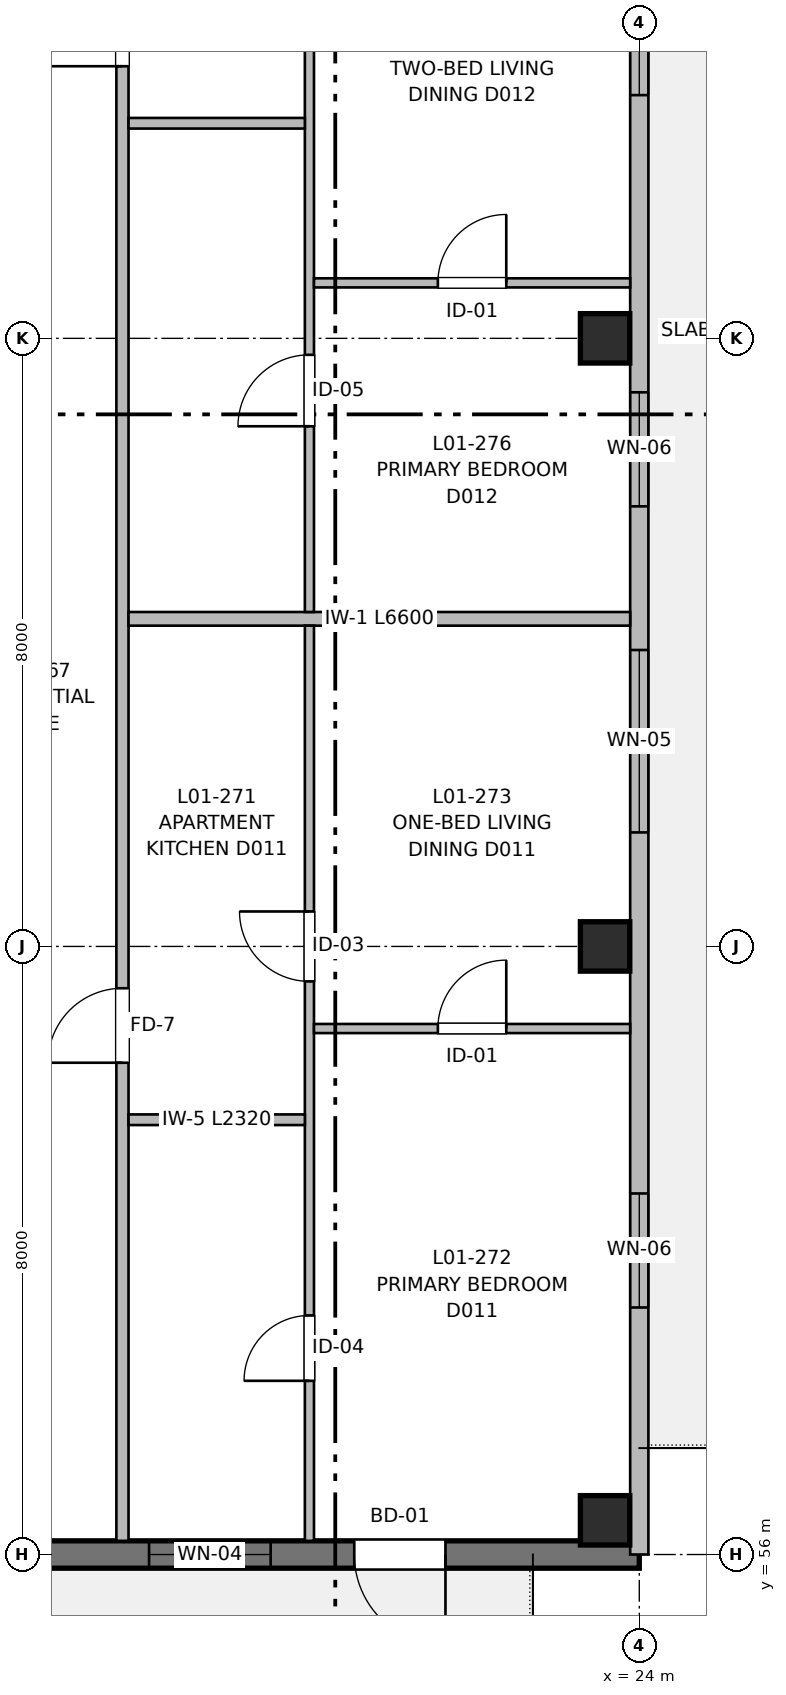
"""IFC4 building model, lengths in metres.
Left out: names, types, materials, properties, quantities, classifications, styles, units other than length and angle.
Written with IfcOpenShell. Run it as: python <this file> out.ifc"""

import sys

from ifc_helpers import new_model, si_unit, direction, frame, frame_2d, origin, origin_2d, place, context, subcontext, project, spatial, rectangle, extrude, element, fill, save


model = new_model("IFC4")
c1 = context("Model", 3, precision=1e-05, world=origin(), true_north=direction((0.0, 1.0)))
c2 = subcontext(c1, "Body", "Model", "MODEL_VIEW")
j1 = project(units=[si_unit("LENGTHUNIT", "METRE"), si_unit("PLANEANGLEUNIT", "RADIAN")], contexts=[c1])
p1 = place(None, origin())
s1 = spatial("IfcSite", under=j1, at=p1, CompositionType="ELEMENT")
p2 = place(p1, origin())
s2 = spatial("IfcBuilding", under=s1, at=p2, CompositionType="ELEMENT")
p3 = place(p2, frame((0.0, 0.0, 4.16)))
s3 = spatial("IfcBuildingStorey", under=s2, at=p3, CompositionType="ELEMENT", Elevation=4.16)
for number, where, z_axis, x_axis in (
    (1, (23.55, 56.45, 0.0), (0.0, 0.0, 1.0), (1.0, 0.0, 0.0)),
    (2, (23.55, 64.0, 0.0), (0.0, 0.0, 1.0), (1.0, 0.0, 0.0)),
    (3, (23.55, 72.0, 0.0), (0.0, 0.0, 1.0), (1.0, 0.0, 0.0)),
):
    element("IfcColumn", number, at=place(p3, frame(where, z_axis=z_axis, x_axis=x_axis)), inside=s3, PredefinedType="COLUMN", context=c2, shape_type="SweptSolid", body=[
        extrude(rectangle(XDim=0.65, YDim=0.65, at=origin_2d()), origin(), (0.0, 0.0, 1.0), 3.2),
    ])
p4 = place(p3, frame((24.0, 56.0, 0.0), z_axis=(0.0, 0.0, 1.0), x_axis=(-1.0, 0.0, 0.0)))
e4 = element("IfcWall", 4, at=p4, inside=s3, PredefinedType="SHEAR", context=c2, shape_type="SweptSolid", body=[
    extrude(rectangle(XDim=16.0, YDim=0.36, at=frame_2d((8.0, 0.0))), origin(), (0.0, 0.0, 1.0), 2.98),
])
p5 = place(p4, frame((2.55, 0.0, 0.0)))
e5 = element("IfcOpeningElement", 5, at=p5, cuts=e4, PredefinedType="OPENING", context=c2, shape_type="SweptSolid", body=[
    extrude(rectangle(XDim=1.2, YDim=2.2, at=frame_2d((0.6, 1.1))), frame((0.0, 0.19, 0.0), z_axis=(0.0, -1.0, 0.0), x_axis=(1.0, 0.0, 0.0)), (0.0, 0.0, 1.0), 0.38),
])
p6 = place(p4, frame((4.85, 0.0, 0.77)))
e6 = element("IfcOpeningElement", 6, at=p6, cuts=e4, PredefinedType="OPENING", context=c2, shape_type="SweptSolid", body=[
    extrude(rectangle(XDim=1.6, YDim=1.45, at=frame_2d((0.8, 0.725))), frame((0.0, 0.19, 0.0), z_axis=(0.0, -1.0, 0.0), x_axis=(1.0, 0.0, 0.0)), (0.0, 0.0, 1.0), 0.38),
])
p7 = place(p4, frame((11.2, 0.0, 0.77)))
e7 = element("IfcOpeningElement", 7, at=p7, cuts=e4, PredefinedType="OPENING", context=c2, shape_type="SweptSolid", body=[
    extrude(rectangle(XDim=1.6, YDim=1.45, at=frame_2d((0.8, 0.725))), frame((0.0, 0.19, 0.0), z_axis=(0.0, -1.0, 0.0), x_axis=(1.0, 0.0, 0.0)), (0.0, 0.0, 1.0), 0.38),
])
p8 = place(p3, frame((24.0, 88.0, 0.0), z_axis=(0.0, 0.0, 1.0), x_axis=(0.0, -1.0, 0.0)))
e8 = element("IfcWall", 8, at=p8, inside=s3, PredefinedType="SOLIDWALL", context=c2, shape_type="SweptSolid", body=[
    extrude(rectangle(XDim=32.0, YDim=0.24, at=frame_2d((16.0, 0.0))), origin(), (0.0, 0.0, 1.0), 2.98),
])
p9 = place(p8, frame((3.4, 0.0, 0.0)))
e9 = element("IfcOpeningElement", 9, at=p9, cuts=e8, PredefinedType="OPENING", context=c2, shape_type="SweptSolid", body=[
    extrude(rectangle(XDim=1.2, YDim=2.2, at=frame_2d((0.6, 1.1))), frame((0.0, 0.13, 0.0), z_axis=(0.0, -1.0, 0.0), x_axis=(1.0, 0.0, 0.0)), (0.0, 0.0, 1.0), 0.26),
])
p10 = place(p8, frame((5.75, 0.0, 0.77)))
e10 = element("IfcOpeningElement", 10, at=p10, cuts=e8, PredefinedType="OPENING", context=c2, shape_type="SweptSolid", body=[
    extrude(rectangle(XDim=1.6, YDim=1.45, at=frame_2d((0.8, 0.725))), frame((0.0, 0.13, 0.0), z_axis=(0.0, -1.0, 0.0), x_axis=(1.0, 0.0, 0.0)), (0.0, 0.0, 1.0), 0.26),
])
p11 = place(p8, frame((11.2, 0.0, 0.77)))
e11 = element("IfcOpeningElement", 11, at=p11, cuts=e8, PredefinedType="OPENING", context=c2, shape_type="SweptSolid", body=[
    extrude(rectangle(XDim=1.6, YDim=1.45, at=frame_2d((0.8, 0.725))), frame((0.0, 0.13, 0.0), z_axis=(0.0, -1.0, 0.0), x_axis=(1.0, 0.0, 0.0)), (0.0, 0.0, 1.0), 0.26),
])
p12 = place(p8, frame((20.1, 0.0, 0.72)))
e12 = element("IfcOpeningElement", 12, at=p12, cuts=e8, PredefinedType="OPENING", context=c2, shape_type="SweptSolid", body=[
    extrude(rectangle(XDim=2.4, YDim=1.5, at=frame_2d((1.2, 0.75))), frame((0.0, 0.13, 0.0), z_axis=(0.0, -1.0, 0.0), x_axis=(1.0, 0.0, 0.0)), (0.0, 0.0, 1.0), 0.26),
])
p13 = place(p8, frame((27.25, 0.0, 0.82)))
e13 = element("IfcOpeningElement", 13, at=p13, cuts=e8, PredefinedType="OPENING", context=c2, shape_type="SweptSolid", body=[
    extrude(rectangle(XDim=1.5, YDim=1.4, at=frame_2d((0.75, 0.7))), frame((0.0, 0.13, 0.0), z_axis=(0.0, -1.0, 0.0), x_axis=(1.0, 0.0, 0.0)), (0.0, 0.0, 1.0), 0.26),
])
p14 = place(p8, frame((16.71, 0.0, 0.82)))
e14 = element("IfcOpeningElement", 14, at=p14, cuts=e8, PredefinedType="OPENING", context=c2, shape_type="SweptSolid", body=[
    extrude(rectangle(XDim=1.5, YDim=1.4, at=frame_2d((0.75, 0.7))), frame((0.0, 0.13, 0.0), z_axis=(0.0, -1.0, 0.0), x_axis=(1.0, 0.0, 0.0)), (0.0, 0.0, 1.0), 0.26),
])
p15 = place(p3, frame((17.2, 56.18, 0.0), z_axis=(0.0, 0.0, 1.0), x_axis=(0.0, 1.0, 0.0)))
e15 = element("IfcWall", 15, at=p15, inside=s3, PredefinedType="PARTITIONING", context=c2, shape_type="SweptSolid", body=[
    extrude(rectangle(XDim=50.62, YDim=0.16, at=frame_2d((25.31, 0.0))), origin(), (0.0, 0.0, 1.0), 2.935),
])
p16 = place(p15, frame((6.29, 0.0, 0.0)))
e16 = element("IfcOpeningElement", 16, at=p16, cuts=e15, PredefinedType="OPENING", context=c2, shape_type="SweptSolid", body=[
    extrude(rectangle(XDim=0.98, YDim=2.15, at=frame_2d((0.49, 1.075))), frame((0.0, 0.09, 0.0), z_axis=(0.0, -1.0, 0.0), x_axis=(1.0, 0.0, 0.0)), (0.0, 0.0, 1.0), 0.18),
])
p17 = place(p15, frame((19.4, 0.0, 0.0)))
e17 = element("IfcOpeningElement", 17, at=p17, cuts=e15, PredefinedType="OPENING", context=c2, shape_type="SweptSolid", body=[
    extrude(rectangle(XDim=1.02, YDim=2.15, at=frame_2d((0.51, 1.075))), frame((0.0, 0.09, 0.0), z_axis=(0.0, -1.0, 0.0), x_axis=(1.0, 0.0, 0.0)), (0.0, 0.0, 1.0), 0.18),
])
p18 = place(p15, frame((33.08, 0.0, 0.0)))
e18 = element("IfcOpeningElement", 18, at=p18, cuts=e15, PredefinedType="OPENING", context=c2, shape_type="SweptSolid", body=[
    extrude(rectangle(XDim=0.98, YDim=2.15, at=frame_2d((0.49, 1.075))), frame((0.0, 0.09, 0.0), z_axis=(0.0, -1.0, 0.0), x_axis=(1.0, 0.0, 0.0)), (0.0, 0.0, 1.0), 0.18),
])
p19 = place(p15, frame((45.33, 0.0, 0.0)))
e19 = element("IfcOpeningElement", 19, at=p19, cuts=e15, PredefinedType="OPENING", context=c2, shape_type="SweptSolid", body=[
    extrude(rectangle(XDim=0.98, YDim=2.15, at=frame_2d((0.49, 1.075))), frame((0.0, 0.09, 0.0), z_axis=(0.0, -1.0, 0.0), x_axis=(1.0, 0.0, 0.0)), (0.0, 0.0, 1.0), 0.18),
])
p20 = place(p3, frame((17.28, 68.31, 0.0), z_axis=(0.0, 0.0, 1.0), x_axis=(1.0, 0.0, 0.0)))
e20 = element("IfcWall", 20, at=p20, inside=s3, PredefinedType="PARTITIONING", context=c2, shape_type="SweptSolid", body=[
    extrude(rectangle(XDim=6.6, YDim=0.18, at=frame_2d((3.3, 0.0))), origin(), (0.0, 0.0, 1.0), 2.935),
])
p21 = place(p3, frame((19.66, 56.18, 0.0), z_axis=(0.0, 0.0, 1.0), x_axis=(0.0, 1.0, 0.0)))
e21 = element("IfcWall", 21, at=p21, inside=s3, PredefinedType="PARTITIONING", context=c2, shape_type="SweptSolid", body=[
    extrude(rectangle(XDim=12.04, YDim=0.12, at=frame_2d((6.02, 0.0))), origin(), (0.0, 0.0, 1.0), 2.935),
])
p22 = place(p21, frame((2.105, 0.0, 0.0)))
e22 = element("IfcOpeningElement", 22, at=p22, cuts=e21, PredefinedType="OPENING", context=c2, shape_type="SweptSolid", body=[
    extrude(rectangle(XDim=0.86, YDim=2.1, at=frame_2d((0.43, 1.05))), frame((0.0, 0.07, 0.0), z_axis=(0.0, -1.0, 0.0), x_axis=(1.0, 0.0, 0.0)), (0.0, 0.0, 1.0), 0.14),
])
p23 = place(p21, frame((7.36, 0.0, 0.0)))
e23 = element("IfcOpeningElement", 23, at=p23, cuts=e21, PredefinedType="OPENING", context=c2, shape_type="SweptSolid", body=[
    extrude(rectangle(XDim=0.92, YDim=2.1, at=frame_2d((0.46, 1.05))), frame((0.0, 0.07, 0.0), z_axis=(0.0, -1.0, 0.0), x_axis=(1.0, 0.0, 0.0)), (0.0, 0.0, 1.0), 0.14),
])
p24 = place(p3, frame((17.28, 61.72, 0.0), z_axis=(0.0, 0.0, 1.0), x_axis=(1.0, 0.0, 0.0)))
e24 = element("IfcWall", 24, at=p24, inside=s3, PredefinedType="PARTITIONING", context=c2, shape_type="SweptSolid", body=[
    extrude(rectangle(XDim=2.32, YDim=0.14, at=frame_2d((1.16, 0.0))), origin(), (0.0, 0.0, 1.0), 2.935),
])
p25 = place(p3, frame((19.72, 62.92, 0.0), z_axis=(0.0, 0.0, 1.0), x_axis=(1.0, 0.0, 0.0)))
e25 = element("IfcWall", 25, at=p25, inside=s3, PredefinedType="PARTITIONING", context=c2, shape_type="SweptSolid", body=[
    extrude(rectangle(XDim=4.16, YDim=0.12, at=frame_2d((2.08, 0.0))), origin(), (0.0, 0.0, 1.0), 2.935),
])
p26 = place(p25, frame((1.63, 0.0, 0.0)))
e26 = element("IfcOpeningElement", 26, at=p26, cuts=e25, PredefinedType="OPENING", context=c2, shape_type="SweptSolid", body=[
    extrude(rectangle(XDim=0.9, YDim=2.1, at=frame_2d((0.45, 1.05))), frame((0.0, 0.07, 0.0), z_axis=(0.0, -1.0, 0.0), x_axis=(1.0, 0.0, 0.0)), (0.0, 0.0, 1.0), 0.14),
])
p27 = place(p3, frame((19.66, 68.4, 0.0), z_axis=(0.0, 0.0, 1.0), x_axis=(0.0, 1.0, 0.0)))
e27 = element("IfcWall", 27, at=p27, inside=s3, PredefinedType="PARTITIONING", context=c2, shape_type="SweptSolid", body=[
    extrude(rectangle(XDim=13.97, YDim=0.12, at=frame_2d((6.985, 0.0))), origin(), (0.0, 0.0, 1.0), 2.935),
])
p28 = place(p27, frame((2.443, 0.0, 0.0)))
e28 = element("IfcOpeningElement", 28, at=p28, cuts=e27, PredefinedType="OPENING", context=c2, shape_type="SweptSolid", body=[
    extrude(rectangle(XDim=0.94, YDim=2.1, at=frame_2d((0.47, 1.05))), frame((0.0, 0.07, 0.0), z_axis=(0.0, -1.0, 0.0), x_axis=(1.0, 0.0, 0.0)), (0.0, 0.0, 1.0), 0.14),
])
p29 = place(p27, frame((8.541, 0.0, 0.0)))
e29 = element("IfcOpeningElement", 29, at=p29, cuts=e27, PredefinedType="OPENING", context=c2, shape_type="SweptSolid", body=[
    extrude(rectangle(XDim=0.92, YDim=2.1, at=frame_2d((0.46, 1.05))), frame((0.0, 0.07, 0.0), z_axis=(0.0, -1.0, 0.0), x_axis=(1.0, 0.0, 0.0)), (0.0, 0.0, 1.0), 0.14),
])
p30 = place(p3, frame((17.28, 74.83, 0.0), z_axis=(0.0, 0.0, 1.0), x_axis=(1.0, 0.0, 0.0)))
e30 = element("IfcWall", 30, at=p30, inside=s3, PredefinedType="PARTITIONING", context=c2, shape_type="SweptSolid", body=[
    extrude(rectangle(XDim=2.32, YDim=0.14, at=frame_2d((1.16, 0.0))), origin(), (0.0, 0.0, 1.0), 2.935),
])
p31 = place(p3, frame((19.72, 72.73, 0.0), z_axis=(0.0, 0.0, 1.0), x_axis=(1.0, 0.0, 0.0)))
e31 = element("IfcWall", 31, at=p31, inside=s3, PredefinedType="PARTITIONING", context=c2, shape_type="SweptSolid", body=[
    extrude(rectangle(XDim=4.16, YDim=0.12, at=frame_2d((2.08, 0.0))), origin(), (0.0, 0.0, 1.0), 2.935),
])
p32 = place(p31, frame((1.63, 0.0, 0.0)))
e32 = element("IfcOpeningElement", 32, at=p32, cuts=e31, PredefinedType="OPENING", context=c2, shape_type="SweptSolid", body=[
    extrude(rectangle(XDim=0.9, YDim=2.1, at=frame_2d((0.45, 1.05))), frame((0.0, 0.07, 0.0), z_axis=(0.0, -1.0, 0.0), x_axis=(1.0, 0.0, 0.0)), (0.0, 0.0, 1.0), 0.14),
])
p33 = place(p5, origin())
e33 = element("IfcDoor", 33, at=p33, inside=s3, OperationType="SINGLE_SWING_LEFT", PredefinedType="DOOR", context=c2, shape_type="SweptSolid", body=[
    extrude(rectangle(XDim=1.2, YDim=2.2, at=frame_2d((0.6, 1.1))), frame((0.0, 0.025, 0.0), z_axis=(0.0, -1.0, 0.0), x_axis=(1.0, 0.0, 0.0)), (0.0, 0.0, 1.0), 0.05),
])
fill(e5, e33)
p34 = place(p6, origin())
e34 = element("IfcWindow", 34, at=p34, inside=s3, PartitioningType="SINGLE_PANEL", PredefinedType="WINDOW", context=c2, shape_type="SweptSolid", body=[
    extrude(rectangle(XDim=1.6, YDim=1.45, at=frame_2d((0.8, 0.725))), frame((0.0, 0.03, 0.0), z_axis=(0.0, -1.0, 0.0), x_axis=(1.0, 0.0, 0.0)), (0.0, 0.0, 1.0), 0.06),
])
fill(e6, e34)
p35 = place(p11, origin())
e35 = element("IfcWindow", 35, at=p35, inside=s3, PartitioningType="SINGLE_PANEL", PredefinedType="WINDOW", context=c2, shape_type="SweptSolid", body=[
    extrude(rectangle(XDim=1.6, YDim=1.45, at=frame_2d((0.8, 0.725))), frame((0.0, 0.03, 0.0), z_axis=(0.0, -1.0, 0.0), x_axis=(1.0, 0.0, 0.0)), (0.0, 0.0, 1.0), 0.06),
])
fill(e11, e35)
p36 = place(p12, origin())
e36 = element("IfcWindow", 36, at=p36, inside=s3, PartitioningType="SINGLE_PANEL", PredefinedType="WINDOW", context=c2, shape_type="SweptSolid", body=[
    extrude(rectangle(XDim=2.4, YDim=1.5, at=frame_2d((1.2, 0.75))), frame((0.0, 0.03, 0.0), z_axis=(0.0, -1.0, 0.0), x_axis=(1.0, 0.0, 0.0)), (0.0, 0.0, 1.0), 0.06),
])
fill(e12, e36)
p37 = place(p13, origin())
e37 = element("IfcWindow", 37, at=p37, inside=s3, PartitioningType="SINGLE_PANEL", PredefinedType="WINDOW", context=c2, shape_type="SweptSolid", body=[
    extrude(rectangle(XDim=1.5, YDim=1.4, at=frame_2d((0.75, 0.7))), frame((0.0, 0.03, 0.0), z_axis=(0.0, -1.0, 0.0), x_axis=(1.0, 0.0, 0.0)), (0.0, 0.0, 1.0), 0.06),
])
fill(e13, e37)
p38 = place(p22, origin())
e38 = element("IfcDoor", 38, at=p38, inside=s3, OperationType="SINGLE_SWING_LEFT", PredefinedType="DOOR", context=c2, shape_type="SweptSolid", body=[
    extrude(rectangle(XDim=0.86, YDim=2.1, at=frame_2d((0.43, 1.05))), frame((0.0, 0.025, 0.0), z_axis=(0.0, -1.0, 0.0), x_axis=(1.0, 0.0, 0.0)), (0.0, 0.0, 1.0), 0.05),
])
fill(e22, e38)
p39 = place(p23, origin())
e39 = element("IfcDoor", 39, at=p39, inside=s3, OperationType="SINGLE_SWING_RIGHT", PredefinedType="DOOR", context=c2, shape_type="SweptSolid", body=[
    extrude(rectangle(XDim=0.92, YDim=2.1, at=frame_2d((0.46, 1.05))), frame((0.0, 0.025, 0.0), z_axis=(0.0, -1.0, 0.0), x_axis=(1.0, 0.0, 0.0)), (0.0, 0.0, 1.0), 0.05),
])
fill(e23, e39)
p40 = place(p16, origin())
e40 = element("IfcDoor", 40, at=p40, inside=s3, OperationType="SINGLE_SWING_LEFT", PredefinedType="DOOR", context=c2, shape_type="SweptSolid", body=[
    extrude(rectangle(XDim=0.98, YDim=2.15, at=frame_2d((0.49, 1.075))), frame((0.0, 0.025, 0.0), z_axis=(0.0, -1.0, 0.0), x_axis=(1.0, 0.0, 0.0)), (0.0, 0.0, 1.0), 0.05),
])
fill(e16, e40)
p41 = place(p26, origin())
e41 = element("IfcDoor", 41, at=p41, inside=s3, OperationType="SINGLE_SWING_RIGHT", PredefinedType="DOOR", context=c2, shape_type="SweptSolid", body=[
    extrude(rectangle(XDim=0.9, YDim=2.1, at=frame_2d((0.45, 1.05))), frame((0.0, 0.025, 0.0), z_axis=(0.0, -1.0, 0.0), x_axis=(1.0, 0.0, 0.0)), (0.0, 0.0, 1.0), 0.05),
])
fill(e26, e41)
p42 = place(p28, origin())
e42 = element("IfcDoor", 42, at=p42, inside=s3, OperationType="SINGLE_SWING_LEFT", PredefinedType="DOOR", context=c2, shape_type="SweptSolid", body=[
    extrude(rectangle(XDim=0.94, YDim=2.1, at=frame_2d((0.47, 1.05))), frame((0.0, 0.025, 0.0), z_axis=(0.0, -1.0, 0.0), x_axis=(1.0, 0.0, 0.0)), (0.0, 0.0, 1.0), 0.05),
])
fill(e28, e42)
p43 = place(p17, origin())
e43 = element("IfcDoor", 43, at=p43, inside=s3, OperationType="SINGLE_SWING_LEFT", PredefinedType="DOOR", context=c2, shape_type="SweptSolid", body=[
    extrude(rectangle(XDim=1.02, YDim=2.15, at=frame_2d((0.51, 1.075))), frame((0.0, 0.025, 0.0), z_axis=(0.0, -1.0, 0.0), x_axis=(1.0, 0.0, 0.0)), (0.0, 0.0, 1.0), 0.05),
])
fill(e17, e43)
p44 = place(p32, origin())
e44 = element("IfcDoor", 44, at=p44, inside=s3, OperationType="SINGLE_SWING_RIGHT", PredefinedType="DOOR", context=c2, shape_type="SweptSolid", body=[
    extrude(rectangle(XDim=0.9, YDim=2.1, at=frame_2d((0.45, 1.05))), frame((0.0, 0.025, 0.0), z_axis=(0.0, -1.0, 0.0), x_axis=(1.0, 0.0, 0.0)), (0.0, 0.0, 1.0), 0.05),
])
fill(e32, e44)
p45 = place(p14, origin())
e45 = element("IfcWindow", 45, at=p45, inside=s3, PartitioningType="SINGLE_PANEL", PredefinedType="WINDOW", context=c2, shape_type="SweptSolid", body=[
    extrude(rectangle(XDim=1.5, YDim=1.4, at=frame_2d((0.75, 0.7))), frame((0.0, 0.03, 0.0), z_axis=(0.0, -1.0, 0.0), x_axis=(1.0, 0.0, 0.0)), (0.0, 0.0, 1.0), 0.06),
])
fill(e14, e45)
save(model, sys.argv[1])
